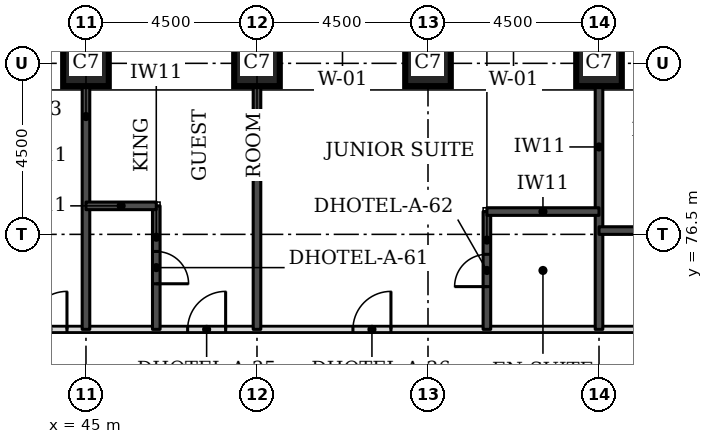
"""IFC4 building model, lengths in metres.
Left out: names, types, materials, properties, quantities, classifications, styles, units other than length and angle.
Written with IfcOpenShell. Run it as: python <this file> out.ifc"""

import sys

from ifc_helpers import new_model, si_unit, direction, frame, frame_2d, origin, origin_2d, place, context, subcontext, project, spatial, rectangle, extrude, element, fill, save


model = new_model("IFC4")
c1 = context("Model", 3, precision=1e-05, world=origin(), true_north=direction((0.0, 1.0)))
c2 = subcontext(c1, "Body", "Model", "MODEL_VIEW")
j1 = project(units=[si_unit("LENGTHUNIT", "METRE"), si_unit("PLANEANGLEUNIT", "RADIAN")], contexts=[c1])
p1 = place(None, origin())
s1 = spatial("IfcSite", under=j1, at=p1, CompositionType="ELEMENT")
p2 = place(p1, origin())
s2 = spatial("IfcBuilding", under=s1, at=p2, CompositionType="ELEMENT")
p3 = place(p2, frame((0.0, 0.0, 49.5)))
s3 = spatial("IfcBuildingStorey", under=s2, at=p3, CompositionType="ELEMENT", Elevation=49.5)
for number, where, z_axis, x_axis in (
    (1, (45.0, 81.0, 0.0), (0.0, 0.0, 1.0), (1.0, 0.0, 0.0)),
    (2, (49.5, 81.0, 0.0), (0.0, 0.0, 1.0), (1.0, 0.0, 0.0)),
    (3, (54.0, 81.0, 0.0), (0.0, 0.0, 1.0), (1.0, 0.0, 0.0)),
    (4, (58.5, 81.0, 0.0), (0.0, 0.0, 1.0), (1.0, 0.0, 0.0)),
):
    element("IfcColumn", number, at=place(p3, frame(where, z_axis=z_axis, x_axis=x_axis)), inside=s3, PredefinedType="COLUMN", context=c2, shape_type="SweptSolid", body=[
        extrude(rectangle(XDim=1.2, YDim=1.2, at=origin_2d()), origin(), (0.0, 0.0, 1.0), 3.3),
    ])
p4 = place(p3, frame((43.0, 74.0, 0.0), z_axis=(0.0, 0.0, 1.0), x_axis=(1.0, 0.0, 0.0)))
e5 = element("IfcWall", 5, at=p4, inside=s3, PredefinedType="PARTITIONING", context=c2, shape_type="SweptSolid", body=[
    extrude(rectangle(XDim=26.5, YDim=0.15, at=frame_2d((13.25, 0.0))), origin(), (0.0, 0.0, 1.0), 3.08),
])
p5 = place(p4, frame((4.675, 0.0, 0.0)))
e6 = element("IfcOpeningElement", 6, at=p5, cuts=e5, PredefinedType="OPENING", context=c2, shape_type="SweptSolid", body=[
    extrude(rectangle(XDim=1.0, YDim=2.1, at=frame_2d((0.5, 1.05))), frame((0.0, 0.085, 0.0), z_axis=(0.0, -1.0, 0.0), x_axis=(1.0, 0.0, 0.0)), (0.0, 0.0, 1.0), 0.17),
])
p6 = place(p4, frame((9.025, 0.0, 0.0)))
e7 = element("IfcOpeningElement", 7, at=p6, cuts=e5, PredefinedType="OPENING", context=c2, shape_type="SweptSolid", body=[
    extrude(rectangle(XDim=1.0, YDim=2.1, at=frame_2d((0.5, 1.05))), frame((0.0, 0.085, 0.0), z_axis=(0.0, -1.0, 0.0), x_axis=(1.0, 0.0, 0.0)), (0.0, 0.0, 1.0), 0.17),
])
p7 = place(p4, frame((20.725, 0.0, 0.0)))
e8 = element("IfcOpeningElement", 8, at=p7, cuts=e5, PredefinedType="OPENING", context=c2, shape_type="SweptSolid", body=[
    extrude(rectangle(XDim=1.0, YDim=2.1, at=frame_2d((0.5, 1.05))), frame((0.0, 0.085, 0.0), z_axis=(0.0, -1.0, 0.0), x_axis=(1.0, 0.0, 0.0)), (0.0, 0.0, 1.0), 0.17),
])
p8 = place(p4, frame((0.5, 0.0, 0.0)))
e9 = element("IfcOpeningElement", 9, at=p8, cuts=e5, PredefinedType="OPENING", context=c2, shape_type="SweptSolid", body=[
    extrude(rectangle(XDim=1.0, YDim=2.1, at=frame_2d((0.5, 1.05))), frame((0.0, 0.085, 0.0), z_axis=(0.0, -1.0, 0.0), x_axis=(1.0, 0.0, 0.0)), (0.0, 0.0, 1.0), 0.17),
])
p9 = place(p4, frame((25.0, 0.0, 0.0)))
e10 = element("IfcOpeningElement", 10, at=p9, cuts=e5, PredefinedType="OPENING", context=c2, shape_type="SweptSolid", body=[
    extrude(rectangle(XDim=1.0, YDim=2.1, at=frame_2d((0.5, 1.05))), frame((0.0, 0.085, 0.0), z_axis=(0.0, -1.0, 0.0), x_axis=(1.0, 0.0, 0.0)), (0.0, 0.0, 1.0), 0.17),
])
p10 = place(p3, frame((45.0, 74.0, 0.0), z_axis=(0.0, 0.0, 1.0), x_axis=(0.0, 1.0, 0.0)))
e11 = element("IfcWall", 11, at=p10, inside=s3, PredefinedType="SOLIDWALL", context=c2, shape_type="SweptSolid", body=[
    extrude(rectangle(XDim=6.4, YDim=0.2, at=frame_2d((3.2, 0.0))), origin(), (0.0, 0.0, 1.0), 3.08),
])
p11 = place(p3, frame((46.85, 74.0, 0.0), z_axis=(0.0, 0.0, 1.0), x_axis=(0.0, 1.0, 0.0)))
e12 = element("IfcWall", 12, at=p11, inside=s3, PredefinedType="SOLIDWALL", context=c2, shape_type="SweptSolid", body=[
    extrude(rectangle(XDim=3.25, YDim=0.2, at=frame_2d((1.625, 0.0))), origin(), (0.0, 0.0, 1.0), 3.08),
])
p12 = place(p11, frame((1.2, 0.0, 0.0)))
e13 = element("IfcOpeningElement", 13, at=p12, cuts=e12, PredefinedType="OPENING", context=c2, shape_type="SweptSolid", body=[
    extrude(rectangle(XDim=0.85, YDim=2.1, at=frame_2d((0.425, 1.05))), frame((0.0, 0.11, 0.0), z_axis=(0.0, -1.0, 0.0), x_axis=(1.0, 0.0, 0.0)), (0.0, 0.0, 1.0), 0.22),
])
p13 = place(p3, frame((49.5, 74.0, 0.0), z_axis=(0.0, 0.0, 1.0), x_axis=(0.0, 1.0, 0.0)))
e14 = element("IfcWall", 14, at=p13, inside=s3, PredefinedType="SOLIDWALL", context=c2, shape_type="SweptSolid", body=[
    extrude(rectangle(XDim=6.4, YDim=0.2, at=frame_2d((3.2, 0.0))), origin(), (0.0, 0.0, 1.0), 3.08),
])
p14 = place(p3, frame((55.55, 74.0, 0.0), z_axis=(0.0, 0.0, 1.0), x_axis=(0.0, 1.0, 0.0)))
e15 = element("IfcWall", 15, at=p14, inside=s3, PredefinedType="SOLIDWALL", context=c2, shape_type="SweptSolid", body=[
    extrude(rectangle(XDim=3.1, YDim=0.2, at=frame_2d((1.55, 0.0))), origin(), (0.0, 0.0, 1.0), 3.08),
])
p15 = place(p14, frame((1.125, 0.0, 0.0)))
e16 = element("IfcOpeningElement", 16, at=p15, cuts=e15, PredefinedType="OPENING", context=c2, shape_type="SweptSolid", body=[
    extrude(rectangle(XDim=0.85, YDim=2.1, at=frame_2d((0.425, 1.05))), frame((0.0, 0.11, 0.0), z_axis=(0.0, -1.0, 0.0), x_axis=(1.0, 0.0, 0.0)), (0.0, 0.0, 1.0), 0.22),
])
p16 = place(p3, frame((58.5, 74.0, 0.0), z_axis=(0.0, 0.0, 1.0), x_axis=(0.0, 1.0, 0.0)))
e17 = element("IfcWall", 17, at=p16, inside=s3, PredefinedType="SOLIDWALL", context=c2, shape_type="SweptSolid", body=[
    extrude(rectangle(XDim=6.4, YDim=0.2, at=frame_2d((3.2, 0.0))), origin(), (0.0, 0.0, 1.0), 3.08),
])
p17 = place(p3, frame((58.5, 76.6, 0.0), z_axis=(0.0, 0.0, 1.0), x_axis=(1.0, 0.0, 0.0)))
e18 = element("IfcWall", 18, at=p17, inside=s3, PredefinedType="SOLIDWALL", context=c2, shape_type="SweptSolid", body=[
    extrude(rectangle(XDim=2.45, YDim=0.2, at=frame_2d((1.225, 0.0))), origin(), (0.0, 0.0, 1.0), 3.08),
])
p18 = place(p3, frame((55.55, 77.1, 0.0), z_axis=(0.0, 0.0, 1.0), x_axis=(1.0, 0.0, 0.0)))
e19 = element("IfcWall", 19, at=p18, inside=s3, PredefinedType="SOLIDWALL", context=c2, shape_type="SweptSolid", body=[
    extrude(rectangle(XDim=2.95, YDim=0.2, at=frame_2d((1.475, 0.0))), origin(), (0.0, 0.0, 1.0), 3.08),
])
p19 = place(p3, frame((45.0, 77.25, 0.0), z_axis=(0.0, 0.0, 1.0), x_axis=(1.0, 0.0, 0.0)))
e20 = element("IfcWall", 20, at=p19, inside=s3, PredefinedType="SOLIDWALL", context=c2, shape_type="SweptSolid", body=[
    extrude(rectangle(XDim=1.85, YDim=0.2, at=frame_2d((0.925, 0.0))), origin(), (0.0, 0.0, 1.0), 3.08),
])
p20 = place(p5, origin())
e21 = element("IfcDoor", 21, at=p20, inside=s3, OperationType="SINGLE_SWING_RIGHT", PredefinedType="DOOR", context=c2, shape_type="SweptSolid", body=[
    extrude(rectangle(XDim=1.0, YDim=2.1, at=frame_2d((0.5, 1.05))), frame((0.0, 0.025, 0.0), z_axis=(0.0, -1.0, 0.0), x_axis=(1.0, 0.0, 0.0)), (0.0, 0.0, 1.0), 0.05),
])
fill(e6, e21)
p21 = place(p12, frame((0.85, 0.0, 0.0), z_axis=(0.0, 0.0, 1.0), x_axis=(-1.0, 0.0, 0.0)))
e22 = element("IfcDoor", 22, at=p21, inside=s3, OperationType="SINGLE_SWING_RIGHT", PredefinedType="DOOR", context=c2, shape_type="SweptSolid", body=[
    extrude(rectangle(XDim=0.85, YDim=2.1, at=frame_2d((0.425, 1.05))), frame((0.0, 0.025, 0.0), z_axis=(0.0, -1.0, 0.0), x_axis=(1.0, 0.0, 0.0)), (0.0, 0.0, 1.0), 0.05),
])
fill(e13, e22)
p22 = place(p6, origin())
e23 = element("IfcDoor", 23, at=p22, inside=s3, OperationType="SINGLE_SWING_RIGHT", PredefinedType="DOOR", context=c2, shape_type="SweptSolid", body=[
    extrude(rectangle(XDim=1.0, YDim=2.1, at=frame_2d((0.5, 1.05))), frame((0.0, 0.025, 0.0), z_axis=(0.0, -1.0, 0.0), x_axis=(1.0, 0.0, 0.0)), (0.0, 0.0, 1.0), 0.05),
])
fill(e7, e23)
p23 = place(p15, origin())
e24 = element("IfcDoor", 24, at=p23, inside=s3, OperationType="SINGLE_SWING_LEFT", PredefinedType="DOOR", context=c2, shape_type="SweptSolid", body=[
    extrude(rectangle(XDim=0.85, YDim=2.1, at=frame_2d((0.425, 1.05))), frame((0.0, 0.025, 0.0), z_axis=(0.0, -1.0, 0.0), x_axis=(1.0, 0.0, 0.0)), (0.0, 0.0, 1.0), 0.05),
])
fill(e16, e24)
p24 = place(p8, origin())
e25 = element("IfcDoor", 25, at=p24, inside=s3, OperationType="SINGLE_SWING_RIGHT", PredefinedType="DOOR", context=c2, shape_type="SweptSolid", body=[
    extrude(rectangle(XDim=1.0, YDim=2.1, at=frame_2d((0.5, 1.05))), frame((0.0, 0.025, 0.0), z_axis=(0.0, -1.0, 0.0), x_axis=(1.0, 0.0, 0.0)), (0.0, 0.0, 1.0), 0.05),
])
fill(e9, e25)
save(model, sys.argv[1])
